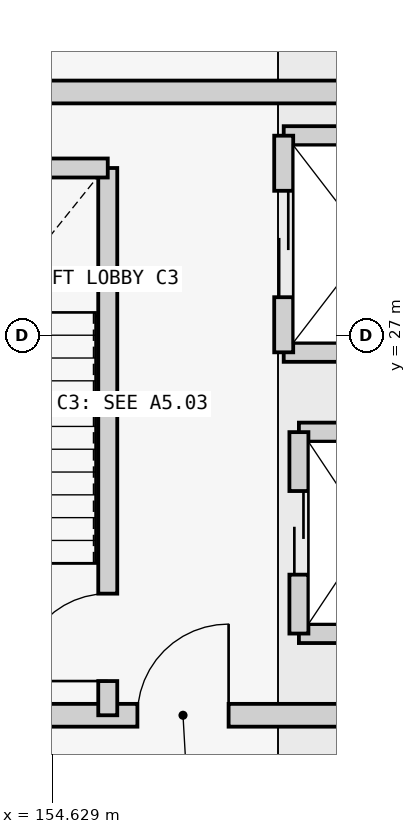
"""IFC4 building model, lengths in metres.
Left out: names, types, materials, properties, quantities, classifications, styles, units other than length and angle.
Written with IfcOpenShell. Run it as: python <this file> out.ifc"""

import sys

from ifc_helpers import new_model, si_unit, direction, frame, frame_2d, origin, place, context, subcontext, project, spatial, rectangle, extrude, element, fill, save


model = new_model("IFC4")
c1 = context("Model", 3, precision=1e-05, world=origin(), true_north=direction((0.0, 1.0)))
c2 = subcontext(c1, "Body", "Model", "MODEL_VIEW")
j1 = project(units=[si_unit("LENGTHUNIT", "METRE"), si_unit("PLANEANGLEUNIT", "RADIAN")], contexts=[c1])
p1 = place(None, origin())
s1 = spatial("IfcSite", under=j1, at=p1, CompositionType="ELEMENT")
p2 = place(p1, origin())
s2 = spatial("IfcBuilding", under=s1, at=p2, CompositionType="ELEMENT")
p3 = place(p2, origin())
s3 = spatial("IfcBuildingStorey", under=s2, at=p3, CompositionType="ELEMENT", Elevation=0.0)
p4 = place(p3, frame((151.0, 22.0, 0.0), z_axis=(0.0, 0.0, 1.0), x_axis=(1.0, 0.0, 0.0)))
e1 = element("IfcWall", 1, at=p4, inside=s3, PredefinedType="SHEAR", context=c2, shape_type="SweptSolid", body=[
    extrude(rectangle(XDim=10.2, YDim=0.3, at=frame_2d((5.1, 0.0))), origin(), (0.0, 0.0, 1.0), 3.95),
])
p5 = place(p4, frame((4.75, 0.0, 0.0)))
e2 = element("IfcOpeningElement", 2, at=p5, cuts=e1, PredefinedType="OPENING", context=c2, shape_type="SweptSolid", body=[
    extrude(rectangle(XDim=1.2, YDim=2.15, at=frame_2d((0.6, 1.075))), frame((0.0, 0.16, 0.0), z_axis=(0.0, -1.0, 0.0), x_axis=(1.0, 0.0, 0.0)), (0.0, 0.0, 1.0), 0.32),
])
p6 = place(p3, frame((161.2, 30.2, 0.0), z_axis=(0.0, 0.0, 1.0), x_axis=(-1.0, 0.0, 0.0)))
e3 = element("IfcWall", 3, at=p6, inside=s3, PredefinedType="SHEAR", context=c2, shape_type="SweptSolid", body=[
    extrude(rectangle(XDim=10.2, YDim=0.3, at=frame_2d((5.1, 0.0))), origin(), (0.0, 0.0, 1.0), 3.95),
])
p7 = place(p3, frame((155.36, 22.0, 0.0), z_axis=(0.0, 0.0, 1.0), x_axis=(0.0, 1.0, 0.0)))
e4 = element("IfcWall", 4, at=p7, inside=s3, PredefinedType="SHEAR", context=c2, shape_type="SweptSolid", body=[
    extrude(rectangle(XDim=7.2, YDim=0.25, at=frame_2d((3.6, 0.0))), origin(), (0.0, 0.0, 1.0), 3.95),
])
p8 = place(p7, frame((0.45, 0.0, 0.0)))
e5 = element("IfcOpeningElement", 5, at=p8, cuts=e4, PredefinedType="OPENING", context=c2, shape_type="SweptSolid", body=[
    extrude(rectangle(XDim=1.15, YDim=2.15, at=frame_2d((0.575, 1.075))), frame((0.0, 0.135, 0.0), z_axis=(0.0, -1.0, 0.0), x_axis=(1.0, 0.0, 0.0)), (0.0, 0.0, 1.0), 0.27),
])
p9 = place(p3, frame((151.0, 29.2, 0.0), z_axis=(0.0, 0.0, 1.0), x_axis=(1.0, 0.0, 0.0)))
e6 = element("IfcWall", 6, at=p9, inside=s3, PredefinedType="SHEAR", context=c2, shape_type="SweptSolid", body=[
    extrude(rectangle(XDim=4.36, YDim=0.25, at=frame_2d((2.18, 0.0))), origin(), (0.0, 0.0, 1.0), 3.95),
])
for number, where, z_axis, x_axis in (
    (7, (157.875, 23.075, 0.0), (0.0, 0.0, 1.0), (1.0, 0.0, 0.0)),
    (8, (157.875, 25.725, 0.0), (0.0, 0.0, 1.0), (1.0, 0.0, 0.0)),
):
    element("IfcWall", number, at=place(p3, frame(where, z_axis=z_axis, x_axis=x_axis)), inside=s3, PredefinedType="SHEAR", context=c2, shape_type="SweptSolid", body=[
        extrude(rectangle(XDim=1.85, YDim=0.25, at=frame_2d((0.925, 0.0))), origin(), (0.0, 0.0, 1.0), 3.95),
    ])
p10 = place(p3, frame((157.875, 23.075, 0.0), z_axis=(0.0, 0.0, 1.0), x_axis=(0.0, 1.0, 0.0)))
e9 = element("IfcWall", 9, at=p10, inside=s3, PredefinedType="SHEAR", context=c2, shape_type="SweptSolid", body=[
    extrude(rectangle(XDim=2.65, YDim=0.25, at=frame_2d((1.325, 0.0))), origin(), (0.0, 0.0, 1.0), 3.95),
])
p11 = place(p10, frame((0.775, 0.0, 0.0)))
e10 = element("IfcOpeningElement", 10, at=p11, cuts=e9, PredefinedType="OPENING", context=c2, shape_type="SweptSolid", body=[
    extrude(rectangle(XDim=1.1, YDim=2.15, at=frame_2d((0.55, 1.075))), frame((0.0, 0.135, 0.0), z_axis=(0.0, -1.0, 0.0), x_axis=(1.0, 0.0, 0.0)), (0.0, 0.0, 1.0), 0.27),
])
for number, where, z_axis, x_axis in (
    (11, (157.675, 26.775, 0.0), (0.0, 0.0, 1.0), (1.0, 0.0, 0.0)),
    (12, (157.675, 29.625, 0.0), (0.0, 0.0, 1.0), (1.0, 0.0, 0.0)),
):
    element("IfcWall", number, at=place(p3, frame(where, z_axis=z_axis, x_axis=x_axis)), inside=s3, PredefinedType="SHEAR", context=c2, shape_type="SweptSolid", body=[
        extrude(rectangle(XDim=2.25, YDim=0.25, at=frame_2d((1.125, 0.0))), origin(), (0.0, 0.0, 1.0), 3.95),
    ])
p12 = place(p3, frame((157.675, 26.775, 0.0), z_axis=(0.0, 0.0, 1.0), x_axis=(0.0, 1.0, 0.0)))
e13 = element("IfcWall", 13, at=p12, inside=s3, PredefinedType="SHEAR", context=c2, shape_type="SweptSolid", body=[
    extrude(rectangle(XDim=2.85, YDim=0.25, at=frame_2d((1.425, 0.0))), origin(), (0.0, 0.0, 1.0), 3.95),
])
p13 = place(p12, frame((0.725, 0.0, 0.0)))
e14 = element("IfcOpeningElement", 14, at=p13, cuts=e13, PredefinedType="OPENING", context=c2, shape_type="SweptSolid", body=[
    extrude(rectangle(XDim=1.4, YDim=2.2, at=frame_2d((0.7, 1.1))), frame((0.0, 0.135, 0.0), z_axis=(0.0, -1.0, 0.0), x_axis=(1.0, 0.0, 0.0)), (0.0, 0.0, 1.0), 0.27),
])
p14 = place(p8, origin())
e15 = element("IfcDoor", 15, at=p14, inside=s3, OperationType="SINGLE_SWING_LEFT", PredefinedType="DOOR", context=c2, shape_type="SweptSolid", body=[
    extrude(rectangle(XDim=1.15, YDim=2.15, at=frame_2d((0.575, 1.075))), frame((0.0, 0.025, 0.0), z_axis=(0.0, -1.0, 0.0), x_axis=(1.0, 0.0, 0.0)), (0.0, 0.0, 1.0), 0.05),
])
fill(e5, e15)
p15 = place(p5, origin())
e16 = element("IfcDoor", 16, at=p15, inside=s3, OperationType="SINGLE_SWING_RIGHT", PredefinedType="DOOR", context=c2, shape_type="SweptSolid", body=[
    extrude(rectangle(XDim=1.2, YDim=2.15, at=frame_2d((0.6, 1.075))), frame((0.0, 0.025, 0.0), z_axis=(0.0, -1.0, 0.0), x_axis=(1.0, 0.0, 0.0)), (0.0, 0.0, 1.0), 0.05),
])
fill(e2, e16)
p16 = place(p11, origin())
e17 = element("IfcDoor", 17, at=p16, inside=s3, OperationType="DOUBLE_DOOR_SLIDING", PredefinedType="USERDEFINED", context=c2, shape_type="SweptSolid", body=[
    extrude(rectangle(XDim=1.1, YDim=2.15, at=frame_2d((0.55, 1.075))), frame((0.0, 0.025, 0.0), z_axis=(0.0, -1.0, 0.0), x_axis=(1.0, 0.0, 0.0)), (0.0, 0.0, 1.0), 0.05),
])
fill(e10, e17)
p17 = place(p13, origin())
e18 = element("IfcDoor", 18, at=p17, inside=s3, OperationType="DOUBLE_DOOR_SLIDING", PredefinedType="USERDEFINED", context=c2, shape_type="SweptSolid", body=[
    extrude(rectangle(XDim=1.4, YDim=2.2, at=frame_2d((0.7, 1.1))), frame((0.0, 0.025, 0.0), z_axis=(0.0, -1.0, 0.0), x_axis=(1.0, 0.0, 0.0)), (0.0, 0.0, 1.0), 0.05),
])
fill(e14, e18)
save(model, sys.argv[1])
